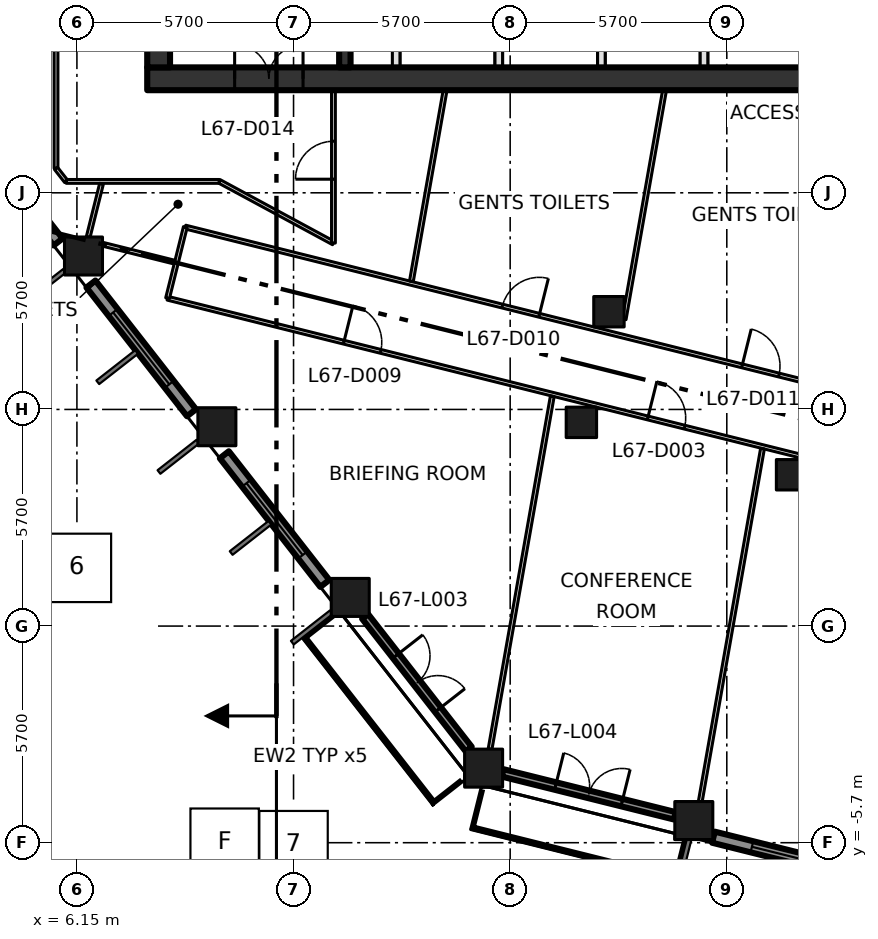
"""IFC4 building model, lengths in metres.
Left out: names, types, materials, properties, quantities, classifications, styles, units other than length and angle.
Written with IfcOpenShell. Run it as: python <this file> out.ifc"""

import sys

from ifc_helpers import new_model, si_unit, direction, frame, frame_2d, origin, origin_2d, place, context, subcontext, project, spatial, rectangle, extrude, element, fill, save


model = new_model("IFC4")
c1 = context("Model", 3, precision=1e-05, world=origin(), true_north=direction((0.0, 1.0)))
c2 = subcontext(c1, "Body", "Model", "MODEL_VIEW")
j1 = project(units=[si_unit("LENGTHUNIT", "METRE"), si_unit("PLANEANGLEUNIT", "RADIAN")], contexts=[c1])
p1 = place(None, origin())
s1 = spatial("IfcSite", under=j1, at=p1, CompositionType="ELEMENT")
p2 = place(p1, origin())
s2 = spatial("IfcBuilding", under=s1, at=p2, CompositionType="ELEMENT")
p3 = place(p2, frame((0.0, 0.0, 294.0)))
s3 = spatial("IfcBuildingStorey", under=s2, at=p3, CompositionType="ELEMENT", Elevation=294.0)
for number, where, z_axis, x_axis in (
    (1, (16.851, -3.738, 0.0), (0.0, 0.0, 1.0), (1.0, 0.0, 0.0)),
    (2, (13.342, 0.754, 0.0), (0.0, 0.0, 1.0), (1.0, 0.0, 0.0)),
    (3, (9.833, 5.245, 0.0), (0.0, 0.0, 1.0), (1.0, 0.0, 0.0)),
    (4, (6.323, 9.737, 0.0), (0.0, 0.0, 1.0), (1.0, 0.0, 0.0)),
    (5, (22.382, -5.117, 0.0), (0.0, 0.0, 1.0), (1.0, 0.0, 0.0)),
):
    element("IfcColumn", number, at=place(p3, frame(where, z_axis=z_axis, x_axis=x_axis)), inside=s3, PredefinedType="COLUMN", context=c2, shape_type="SweptSolid", body=[
        extrude(rectangle(XDim=1.0, YDim=1.0, at=origin_2d()), origin(), (0.0, 0.0, 1.0), 4.2),
    ])
for number, where, z_axis, x_axis in (
    (6, (19.424, 5.36, 0.0), (0.0, 0.0, 1.0), (1.0, 0.0, 0.0)),
    (7, (24.954, 3.981, 0.0), (0.0, 0.0, 1.0), (1.0, 0.0, 0.0)),
    (8, (20.149, 8.271, 0.0), (0.0, 0.0, 1.0), (1.0, 0.0, 0.0)),
):
    element("IfcColumn", number, at=place(p3, frame(where, z_axis=z_axis, x_axis=x_axis)), inside=s3, PredefinedType="COLUMN", context=c2, shape_type="SweptSolid", body=[
        extrude(rectangle(XDim=0.8, YDim=0.8, at=origin_2d()), origin(), (0.0, 0.0, 1.0), 4.2),
    ])
p4 = place(p3, frame((8.0, 14.4, -0.3), z_axis=(0.0, 0.0, 1.0), x_axis=(1.0, 0.0, 0.0)))
e9 = element("IfcWall", 9, at=p4, inside=s3, PredefinedType="SHEAR", context=c2, shape_type="SweptSolid", body=[
    extrude(rectangle(XDim=22.8, YDim=0.6, at=frame_2d((11.4, 0.0))), origin(), (0.0, 0.0, 1.0), 4.2),
])
p5 = place(p4, frame((2.3, 0.0, 0.3)))
e10 = element("IfcOpeningElement", 10, at=p5, cuts=e9, PredefinedType="OPENING", context=c2, shape_type="SweptSolid", body=[
    extrude(rectangle(XDim=1.8, YDim=2.1, at=frame_2d((0.9, 1.05))), frame((0.0, 0.31, 0.0), z_axis=(0.0, -1.0, 0.0), x_axis=(1.0, 0.0, 0.0)), (0.0, 0.0, 1.0), 0.62),
])
p6 = place(p3, frame((8.3, 14.7, -0.3), z_axis=(0.0, 0.0, 1.0), x_axis=(0.0, 1.0, 0.0)))
e11 = element("IfcWall", 11, at=p6, inside=s3, PredefinedType="SHEAR", context=c2, shape_type="SweptSolid", body=[
    extrude(rectangle(XDim=21.0, YDim=0.6, at=frame_2d((10.5, 0.0))), origin(), (0.0, 0.0, 1.0), 4.2),
])
p7 = place(p3, frame((13.2, 14.7, 0.0), z_axis=(0.0, 0.0, 1.0), x_axis=(0.0, 1.0, 0.0)))
e12 = element("IfcWall", 12, at=p7, inside=s3, PredefinedType="SHEAR", context=c2, shape_type="SweptSolid", body=[
    extrude(rectangle(XDim=21.0, YDim=0.3, at=frame_2d((10.5, 0.0))), origin(), (0.0, 0.0, 1.0), 3.9),
])
p8 = place(p7, frame((3.6, 0.0, 0.0)))
e13 = element("IfcOpeningElement", 13, at=p8, cuts=e12, PredefinedType="OPENING", context=c2, shape_type="SweptSolid", body=[
    extrude(rectangle(XDim=1.8, YDim=2.1, at=frame_2d((0.9, 1.05))), frame((0.0, 0.16, 0.0), z_axis=(0.0, -1.0, 0.0), x_axis=(1.0, 0.0, 0.0)), (0.0, 0.0, 1.0), 0.32),
])
p9 = place(p7, frame((11.7, 0.0, 0.0)))
e14 = element("IfcOpeningElement", 14, at=p9, cuts=e12, PredefinedType="OPENING", context=c2, shape_type="SweptSolid", body=[
    extrude(rectangle(XDim=1.2, YDim=2.1, at=frame_2d((0.6, 1.05))), frame((0.0, 0.16, 0.0), z_axis=(0.0, -1.0, 0.0), x_axis=(1.0, 0.0, 0.0)), (0.0, 0.0, 1.0), 0.32),
])
for number, where, z_axis, x_axis in (
    (15, (14.55, 14.7, 0.0), (0.0, 0.0, 1.0), (0.0, 1.0, 0.0)),
    (16, (17.25, 14.7, 0.0), (0.0, 0.0, 1.0), (0.0, 1.0, 0.0)),
    (17, (19.95, 14.7, 0.0), (0.0, 0.0, 1.0), (0.0, 1.0, 0.0)),
    (18, (22.65, 14.7, 0.0), (0.0, 0.0, 1.0), (0.0, 1.0, 0.0)),
):
    element("IfcWall", number, at=place(p3, frame(where, z_axis=z_axis, x_axis=x_axis)), inside=s3, PredefinedType="SOLIDWALL", context=c2, shape_type="SweptSolid", body=[
        extrude(rectangle(XDim=2.9, YDim=0.2, at=frame_2d((1.45, 0.0))), origin(), (0.0, 0.0, 1.0), 3.9),
    ])
p10 = place(p3, frame((3.01, 13.491, 0.0), z_axis=(0.0, 0.0, 1.0), x_axis=(0.615713519567, -0.787970089421, 0.0)))
e19 = element("IfcWall", 19, at=p10, inside=s3, PredefinedType="SOLIDWALL", context=c2, shape_type="SweptSolid", body=[
    extrude(rectangle(XDim=4.296, YDim=0.3, at=frame_2d((2.148, 0.0))), origin(), (0.0, 0.0, 1.0), 3.2),
])
p11 = place(p10, frame((0.948, 0.0, 0.8)))
e20 = element("IfcOpeningElement", 20, at=p11, cuts=e19, PredefinedType="OPENING", context=c2, shape_type="SweptSolid", body=[
    extrude(rectangle(XDim=2.4, YDim=2.1, at=frame_2d((1.2, 1.05))), frame((0.0, 0.16, 0.0), z_axis=(0.0, -1.0, 0.0), x_axis=(1.0, 0.0, 0.0)), (0.0, 0.0, 1.0), 0.32),
])
p12 = place(p3, frame((6.519, 9.0, 0.0), z_axis=(0.0, 0.0, 1.0), x_axis=(0.615634121154, -0.788032124263, 0.0)))
e21 = element("IfcWall", 21, at=p12, inside=s3, PredefinedType="SOLIDWALL", context=c2, shape_type="SweptSolid", body=[
    extrude(rectangle(XDim=4.298, YDim=0.3, at=frame_2d((2.149, 0.0))), origin(), (0.0, 0.0, 1.0), 3.2),
])
p13 = place(p12, frame((0.949, 0.0, 0.8)))
e22 = element("IfcOpeningElement", 22, at=p13, cuts=e21, PredefinedType="OPENING", context=c2, shape_type="SweptSolid", body=[
    extrude(rectangle(XDim=2.4, YDim=2.1, at=frame_2d((1.2, 1.05))), frame((0.0, 0.16, 0.0), z_axis=(0.0, -1.0, 0.0), x_axis=(1.0, 0.0, 0.0)), (0.0, 0.0, 1.0), 0.32),
])
p14 = place(p3, frame((10.029, 4.507, 0.0), z_axis=(0.0, 0.0, 1.0), x_axis=(0.615572343689, -0.788080382756, 0.0)))
e23 = element("IfcWall", 23, at=p14, inside=s3, PredefinedType="SOLIDWALL", context=c2, shape_type="SweptSolid", body=[
    extrude(rectangle(XDim=4.295, YDim=0.3, at=frame_2d((2.147, 0.0))), origin(), (0.0, 0.0, 1.0), 3.2),
])
p15 = place(p14, frame((0.948, 0.0, 0.8)))
e24 = element("IfcOpeningElement", 24, at=p15, cuts=e23, PredefinedType="OPENING", context=c2, shape_type="SweptSolid", body=[
    extrude(rectangle(XDim=2.4, YDim=2.1, at=frame_2d((1.2, 1.05))), frame((0.0, 0.16, 0.0), z_axis=(0.0, -1.0, 0.0), x_axis=(1.0, 0.0, 0.0)), (0.0, 0.0, 1.0), 0.32),
])
p16 = place(p3, frame((13.733, 0.254, 0.0), z_axis=(0.0, 0.0, 1.0), x_axis=(0.615499674676, -0.788137139382, 0.0)))
e25 = element("IfcWall", 25, at=p16, inside=s3, PredefinedType="SOLIDWALL", context=c2, shape_type="SweptSolid", body=[
    extrude(rectangle(XDim=4.431, YDim=0.2, at=frame_2d((2.215, 0.0))), origin(), (0.0, 0.0, 1.0), 3.2),
])
p17 = place(p16, frame((1.315, 0.0, 0.0)))
e26 = element("IfcOpeningElement", 26, at=p17, cuts=e25, PredefinedType="OPENING", context=c2, shape_type="SweptSolid", body=[
    extrude(rectangle(XDim=1.8, YDim=2.9, at=frame_2d((0.9, 1.45))), frame((0.0, 0.11, 0.0), z_axis=(0.0, -1.0, 0.0), x_axis=(1.0, 0.0, 0.0)), (0.0, 0.0, 1.0), 0.22),
])
p18 = place(p3, frame((12.398, -0.199, 0.0), z_axis=(0.0, 0.0, 1.0), x_axis=(0.615638738903, -0.788028516719, 0.0)))
e27 = element("IfcWall", 27, at=p18, inside=s3, PredefinedType="SOLIDWALL", context=c2, shape_type="SweptSolid", body=[
    extrude(rectangle(XDim=5.36, YDim=0.4, at=frame_2d((2.68, 0.0))), origin(), (0.0, 0.0, 1.0), 0.3),
])
p19 = place(p3, frame((17.351, -3.863, 0.0), z_axis=(0.0, 0.0, 1.0), x_axis=(0.970335948358, -0.241760516472, 0.0)))
e28 = element("IfcWall", 28, at=p19, inside=s3, PredefinedType="SOLIDWALL", context=c2, shape_type="SweptSolid", body=[
    extrude(rectangle(XDim=4.669, YDim=0.2, at=frame_2d((2.335, 0.0))), origin(), (0.0, 0.0, 1.0), 3.2),
])
p20 = place(p19, frame((1.434, 0.0, 0.0)))
e29 = element("IfcOpeningElement", 29, at=p20, cuts=e28, PredefinedType="OPENING", context=c2, shape_type="SweptSolid", body=[
    extrude(rectangle(XDim=1.8, YDim=2.9, at=frame_2d((0.9, 1.45))), frame((0.0, 0.11, 0.0), z_axis=(0.0, -1.0, 0.0), x_axis=(1.0, 0.0, 0.0)), (0.0, 0.0, 1.0), 0.22),
])
p21 = place(p3, frame((16.694, -5.069, 0.0), z_axis=(0.0, 0.0, 1.0), x_axis=(0.970289679319, -0.241946147329, 0.0)))
e30 = element("IfcWall", 30, at=p21, inside=s3, PredefinedType="SOLIDWALL", context=c2, shape_type="SweptSolid", body=[
    extrude(rectangle(XDim=5.36, YDim=0.4, at=frame_2d((2.68, 0.0))), origin(), (0.0, 0.0, 1.0), 0.3),
])
p22 = place(p3, frame((22.898, -5.555, 0.0), z_axis=(0.0, 0.0, 1.0), x_axis=(0.970315118421, -0.24184410467, 0.0)))
e31 = element("IfcWall", 31, at=p22, inside=s3, PredefinedType="SOLIDWALL", context=c2, shape_type="SweptSolid", body=[
    extrude(rectangle(XDim=4.486, YDim=0.3, at=frame_2d((2.243, 0.0))), origin(), (0.0, 0.0, 1.0), 3.2),
])
p23 = place(p22, frame((1.044, 0.0, 0.8)))
e32 = element("IfcOpeningElement", 32, at=p23, cuts=e31, PredefinedType="OPENING", context=c2, shape_type="SweptSolid", body=[
    extrude(rectangle(XDim=2.4, YDim=2.1, at=frame_2d((1.2, 1.05))), frame((0.0, 0.16, 0.0), z_axis=(0.0, -1.0, 0.0), x_axis=(1.0, 0.0, 0.0)), (0.0, 0.0, 1.0), 0.32),
])
p24 = place(p3, frame((5.6, 12.043, 0.0), z_axis=(0.0, 0.0, 1.0), x_axis=(0.0, 1.0, 0.0)))
e33 = element("IfcWall", 33, at=p24, inside=s3, PredefinedType="PARTITIONING", context=c2, shape_type="SweptSolid", body=[
    extrude(rectangle(XDim=27.162, YDim=0.1, at=frame_2d((13.581, 0.0))), origin(), (0.0, 0.0, 1.0), 3.9),
])
p25 = place(p24, frame((4.48, 0.0, 0.0)))
e34 = element("IfcOpeningElement", 34, at=p25, cuts=e33, PredefinedType="OPENING", context=c2, shape_type="SweptSolid", body=[
    extrude(rectangle(XDim=1.0, YDim=2.1, at=frame_2d((0.5, 1.05))), frame((0.0, 0.06, 0.0), z_axis=(0.0, -1.0, 0.0), x_axis=(1.0, 0.0, 0.0)), (0.0, 0.0, 1.0), 0.12),
])
p26 = place(p24, frame((12.742, 0.0, 0.0)))
e35 = element("IfcOpeningElement", 35, at=p26, cuts=e33, PredefinedType="OPENING", context=c2, shape_type="SweptSolid", body=[
    extrude(rectangle(XDim=1.0, YDim=2.1, at=frame_2d((0.5, 1.05))), frame((0.0, 0.06, 0.0), z_axis=(0.0, -1.0, 0.0), x_axis=(1.0, 0.0, 0.0)), (0.0, 0.0, 1.0), 0.12),
])
p27 = place(p24, frame((21.142, 0.0, 0.0)))
e36 = element("IfcOpeningElement", 36, at=p27, cuts=e33, PredefinedType="OPENING", context=c2, shape_type="SweptSolid", body=[
    extrude(rectangle(XDim=1.0, YDim=2.1, at=frame_2d((0.5, 1.05))), frame((0.0, 0.06, 0.0), z_axis=(0.0, -1.0, 0.0), x_axis=(1.0, 0.0, 0.0)), (0.0, 0.0, 1.0), 0.12),
])
p28 = place(p3, frame((5.6, 12.043, 0.0), z_axis=(0.0, 0.0, 1.0), x_axis=(0.615415398102, -0.788202948344, 0.0)))
e37 = element("IfcWall", 37, at=p28, inside=s3, PredefinedType="PARTITIONING", context=c2, shape_type="SweptSolid", body=[
    extrude(rectangle(XDim=0.435, YDim=0.1, at=frame_2d((0.218, 0.0))), origin(), (0.0, 0.0, 1.0), 3.9),
])
p29 = place(p3, frame((5.868, 11.7, 0.0), z_axis=(0.0, 0.0, 1.0), x_axis=(1.0, 0.0, 0.0)))
e38 = element("IfcWall", 38, at=p29, inside=s3, PredefinedType="PARTITIONING", context=c2, shape_type="SweptSolid", body=[
    extrude(rectangle(XDim=4.032, YDim=0.1, at=frame_2d((2.016, 0.0))), origin(), (0.0, 0.0, 1.0), 3.9),
])
p30 = place(p3, frame((8.535, 8.626, 0.0), z_axis=(0.0, 0.0, 1.0), x_axis=(0.970294986727, -0.241924861749, 0.0)))
e39 = element("IfcWall", 39, at=p30, inside=s3, PredefinedType="PARTITIONING", context=c2, shape_type="SweptSolid", body=[
    extrude(rectangle(XDim=28.501, YDim=0.1, at=frame_2d((14.25, 0.0))), origin(), (0.0, 0.0, 1.0), 3.9),
])
p31 = place(p30, frame((13.022, 0.0, 0.0)))
e40 = element("IfcOpeningElement", 40, at=p31, cuts=e39, PredefinedType="OPENING", context=c2, shape_type="SweptSolid", body=[
    extrude(rectangle(XDim=1.0, YDim=2.1, at=frame_2d((0.5, 1.05))), frame((0.0, 0.06, 0.0), z_axis=(0.0, -1.0, 0.0), x_axis=(1.0, 0.0, 0.0)), (0.0, 0.0, 1.0), 0.12),
])
p32 = place(p30, frame((20.622, 0.0, 0.0)))
e41 = element("IfcOpeningElement", 41, at=p32, cuts=e39, PredefinedType="OPENING", context=c2, shape_type="SweptSolid", body=[
    extrude(rectangle(XDim=1.0, YDim=2.1, at=frame_2d((0.5, 1.05))), frame((0.0, 0.06, 0.0), z_axis=(0.0, -1.0, 0.0), x_axis=(1.0, 0.0, 0.0)), (0.0, 0.0, 1.0), 0.12),
])
p33 = place(p30, frame((4.78, 0.0, 0.0)))
e42 = element("IfcOpeningElement", 42, at=p33, cuts=e39, PredefinedType="OPENING", context=c2, shape_type="SweptSolid", body=[
    extrude(rectangle(XDim=1.0, YDim=2.1, at=frame_2d((0.5, 1.05))), frame((0.0, 0.06, 0.0), z_axis=(0.0, -1.0, 0.0), x_axis=(1.0, 0.0, 0.0)), (0.0, 0.0, 1.0), 0.12),
])
p34 = place(p3, frame((9.002, 10.499, 0.0), z_axis=(0.0, 0.0, 1.0), x_axis=(0.970298340477, -0.241911410372, 0.0)))
e43 = element("IfcWall", 43, at=p34, inside=s3, PredefinedType="PARTITIONING", context=c2, shape_type="SweptSolid", body=[
    extrude(rectangle(XDim=19.88, YDim=0.1, at=frame_2d((9.94, 0.0))), origin(), (0.0, 0.0, 1.0), 3.9),
])
p35 = place(p34, frame((8.597, 0.0, 0.0)))
e44 = element("IfcOpeningElement", 44, at=p35, cuts=e43, PredefinedType="OPENING", context=c2, shape_type="SweptSolid", body=[
    extrude(rectangle(XDim=1.0, YDim=2.1, at=frame_2d((0.5, 1.05))), frame((0.0, 0.06, 0.0), z_axis=(0.0, -1.0, 0.0), x_axis=(1.0, 0.0, 0.0)), (0.0, 0.0, 1.0), 0.12),
])
p36 = place(p34, frame((15.098, 0.0, 0.0)))
e45 = element("IfcOpeningElement", 45, at=p36, cuts=e43, PredefinedType="OPENING", context=c2, shape_type="SweptSolid", body=[
    extrude(rectangle(XDim=1.0, YDim=2.1, at=frame_2d((0.5, 1.05))), frame((0.0, 0.06, 0.0), z_axis=(0.0, -1.0, 0.0), x_axis=(1.0, 0.0, 0.0)), (0.0, 0.0, 1.0), 0.12),
])
p37 = place(p3, frame((9.002, 10.499, 0.0), z_axis=(0.0, 0.0, 1.0), x_axis=(-0.241940418317, -0.970291107856, 0.0)))
e46 = element("IfcWall", 46, at=p37, inside=s3, PredefinedType="PARTITIONING", context=c2, shape_type="SweptSolid", body=[
    extrude(rectangle(XDim=1.93, YDim=0.1, at=frame_2d((0.965, 0.0))), origin(), (0.0, 0.0, 1.0), 3.9),
])
p38 = place(p3, frame((9.9, 11.7, 0.0), z_axis=(0.0, 0.0, 1.0), x_axis=(0.87965147249, -0.475618846291, 0.0)))
e47 = element("IfcWall", 47, at=p38, inside=s3, PredefinedType="PARTITIONING", context=c2, shape_type="SweptSolid", body=[
    extrude(rectangle(XDim=3.41, YDim=0.1, at=frame_2d((1.705, 0.0))), origin(), (0.0, 0.0, 1.0), 3.9),
])
p39 = place(p3, frame((12.9, 10.078, 0.0), z_axis=(0.0, 0.0, 1.0), x_axis=(0.0, 1.0, 0.0)))
e48 = element("IfcWall", 48, at=p39, inside=s3, PredefinedType="PARTITIONING", context=c2, shape_type="SweptSolid", body=[
    extrude(rectangle(XDim=4.022, YDim=0.1, at=frame_2d((2.011, 0.0))), origin(), (0.0, 0.0, 1.0), 3.9),
])
p40 = place(p39, frame((1.68, 0.0, 0.0)))
e49 = element("IfcOpeningElement", 49, at=p40, cuts=e48, PredefinedType="OPENING", context=c2, shape_type="SweptSolid", body=[
    extrude(rectangle(XDim=1.0, YDim=2.1, at=frame_2d((0.5, 1.05))), frame((0.0, 0.06, 0.0), z_axis=(0.0, -1.0, 0.0), x_axis=(1.0, 0.0, 0.0)), (0.0, 0.0, 1.0), 0.12),
])
p41 = place(p3, frame((6.797, 11.638, 0.0), z_axis=(0.0, 0.0, 1.0), x_axis=(-0.242456058691, -0.970162388265, 0.0)))
e50 = element("IfcWall", 50, at=p41, inside=s3, PredefinedType="PARTITIONING", context=c2, shape_type="SweptSolid", body=[
    extrude(rectangle(XDim=1.444, YDim=0.1, at=frame_2d((0.722, 0.0))), origin(), (0.0, 0.0, 1.0), 3.9),
])
p42 = place(p3, frame((8.72, 9.575, 0.0), z_axis=(0.0, 0.0, 1.0), x_axis=(-0.970274576003, 0.242006708918, 0.0)))
e51 = element("IfcWall", 51, at=p42, inside=s3, PredefinedType="PARTITIONING", context=c2, shape_type="SweptSolid", body=[
    extrude(rectangle(XDim=1.955, YDim=0.1, at=frame_2d((0.978, 0.0))), origin(), (0.0, 0.0, 1.0), 3.9),
])
p43 = place(p3, frame((14.951, 9.071, 0.0), z_axis=(0.0, 0.0, 1.0), x_axis=(0.173687149785, 0.984800880381, 0.0)))
e52 = element("IfcWall", 52, at=p43, inside=s3, PredefinedType="PARTITIONING", context=c2, shape_type="SweptSolid", body=[
    extrude(rectangle(XDim=5.107, YDim=0.1, at=frame_2d((2.553, 0.0))), origin(), (0.0, 0.0, 1.0), 3.9),
])
p44 = place(p3, frame((17.021, -3.238, 0.0), z_axis=(0.0, 0.0, 1.0), x_axis=(0.173621363154, 0.984812480758, 0.0)))
e53 = element("IfcWall", 53, at=p44, inside=s3, PredefinedType="PARTITIONING", context=c2, shape_type="SweptSolid", body=[
    extrude(rectangle(XDim=9.428, YDim=0.1, at=frame_2d((4.714, 0.0))), origin(), (0.0, 0.0, 1.0), 3.9),
])
p45 = place(p3, frame((20.549, 8.07, 0.0), z_axis=(0.0, 0.0, 1.0), x_axis=(0.173605636367, 0.984815253244, 0.0)))
e54 = element("IfcWall", 54, at=p45, inside=s3, PredefinedType="PARTITIONING", context=c2, shape_type="SweptSolid", body=[
    extrude(rectangle(XDim=6.123, YDim=0.1, at=frame_2d((3.062, 0.0))), origin(), (0.0, 0.0, 1.0), 3.9),
])
p46 = place(p3, frame((22.552, -4.617, 0.0), z_axis=(0.0, 0.0, 1.0), x_axis=(0.173625790791, 0.98481170016, 0.0)))
e55 = element("IfcWall", 55, at=p46, inside=s3, PredefinedType="PARTITIONING", context=c2, shape_type="SweptSolid", body=[
    extrude(rectangle(XDim=9.428, YDim=0.1, at=frame_2d((4.714, 0.0))), origin(), (0.0, 0.0, 1.0), 3.9),
])
p47 = place(p5, origin())
e56 = element("IfcDoor", 56, at=p47, inside=s3, OperationType="DOUBLE_DOOR_SINGLE_SWING", PredefinedType="DOOR", context=c2, shape_type="SweptSolid", body=[
    extrude(rectangle(XDim=1.8, YDim=2.1, at=frame_2d((0.9, 1.05))), frame((0.0, 0.025, 0.0), z_axis=(0.0, -1.0, 0.0), x_axis=(1.0, 0.0, 0.0)), (0.0, 0.0, 1.0), 0.05),
])
fill(e10, e56)
p48 = place(p13, origin())
e57 = element("IfcWindow", 57, at=p48, inside=s3, PartitioningType="DOUBLE_PANEL_VERTICAL", PredefinedType="WINDOW", context=c2, shape_type="SweptSolid", body=[
    extrude(rectangle(XDim=2.4, YDim=2.1, at=frame_2d((1.2, 1.05))), frame((0.0, 0.03, 0.0), z_axis=(0.0, -1.0, 0.0), x_axis=(1.0, 0.0, 0.0)), (0.0, 0.0, 1.0), 0.06),
])
fill(e22, e57)
p49 = place(p15, origin())
e58 = element("IfcWindow", 58, at=p49, inside=s3, PartitioningType="DOUBLE_PANEL_VERTICAL", PredefinedType="WINDOW", context=c2, shape_type="SweptSolid", body=[
    extrude(rectangle(XDim=2.4, YDim=2.1, at=frame_2d((1.2, 1.05))), frame((0.0, 0.03, 0.0), z_axis=(0.0, -1.0, 0.0), x_axis=(1.0, 0.0, 0.0)), (0.0, 0.0, 1.0), 0.06),
])
fill(e24, e58)
p50 = place(p17, origin())
e59 = element("IfcDoor", 59, at=p50, inside=s3, OperationType="DOUBLE_DOOR_SINGLE_SWING", PredefinedType="DOOR", context=c2, shape_type="SweptSolid", body=[
    extrude(rectangle(XDim=1.8, YDim=2.9, at=frame_2d((0.9, 1.45))), frame((0.0, 0.025, 0.0), z_axis=(0.0, -1.0, 0.0), x_axis=(1.0, 0.0, 0.0)), (0.0, 0.0, 1.0), 0.05),
])
fill(e26, e59)
p51 = place(p20, origin())
e60 = element("IfcDoor", 60, at=p51, inside=s3, OperationType="DOUBLE_DOOR_SINGLE_SWING", PredefinedType="DOOR", context=c2, shape_type="SweptSolid", body=[
    extrude(rectangle(XDim=1.8, YDim=2.9, at=frame_2d((0.9, 1.45))), frame((0.0, 0.025, 0.0), z_axis=(0.0, -1.0, 0.0), x_axis=(1.0, 0.0, 0.0)), (0.0, 0.0, 1.0), 0.05),
])
fill(e29, e60)
p52 = place(p23, origin())
e61 = element("IfcWindow", 61, at=p52, inside=s3, PartitioningType="DOUBLE_PANEL_VERTICAL", PredefinedType="WINDOW", context=c2, shape_type="SweptSolid", body=[
    extrude(rectangle(XDim=2.4, YDim=2.1, at=frame_2d((1.2, 1.05))), frame((0.0, 0.03, 0.0), z_axis=(0.0, -1.0, 0.0), x_axis=(1.0, 0.0, 0.0)), (0.0, 0.0, 1.0), 0.06),
])
fill(e32, e61)
p53 = place(p31, origin())
e62 = element("IfcDoor", 62, at=p53, inside=s3, OperationType="SINGLE_SWING_LEFT", PredefinedType="DOOR", context=c2, shape_type="SweptSolid", body=[
    extrude(rectangle(XDim=1.0, YDim=2.1, at=frame_2d((0.5, 1.05))), frame((0.0, 0.025, 0.0), z_axis=(0.0, -1.0, 0.0), x_axis=(1.0, 0.0, 0.0)), (0.0, 0.0, 1.0), 0.05),
])
fill(e40, e62)
p54 = place(p33, origin())
e63 = element("IfcDoor", 63, at=p54, inside=s3, OperationType="SINGLE_SWING_LEFT", PredefinedType="DOOR", context=c2, shape_type="SweptSolid", body=[
    extrude(rectangle(XDim=1.0, YDim=2.1, at=frame_2d((0.5, 1.05))), frame((0.0, 0.025, 0.0), z_axis=(0.0, -1.0, 0.0), x_axis=(1.0, 0.0, 0.0)), (0.0, 0.0, 1.0), 0.05),
])
fill(e42, e63)
p55 = place(p35, origin())
e64 = element("IfcDoor", 64, at=p55, inside=s3, OperationType="SINGLE_SWING_RIGHT", PredefinedType="DOOR", context=c2, shape_type="SweptSolid", body=[
    extrude(rectangle(XDim=1.0, YDim=2.1, at=frame_2d((0.5, 1.05))), frame((0.0, 0.025, 0.0), z_axis=(0.0, -1.0, 0.0), x_axis=(1.0, 0.0, 0.0)), (0.0, 0.0, 1.0), 0.05),
])
fill(e44, e64)
p56 = place(p36, origin())
e65 = element("IfcDoor", 65, at=p56, inside=s3, OperationType="SINGLE_SWING_LEFT", PredefinedType="DOOR", context=c2, shape_type="SweptSolid", body=[
    extrude(rectangle(XDim=1.0, YDim=2.1, at=frame_2d((0.5, 1.05))), frame((0.0, 0.025, 0.0), z_axis=(0.0, -1.0, 0.0), x_axis=(1.0, 0.0, 0.0)), (0.0, 0.0, 1.0), 0.05),
])
fill(e45, e65)
p57 = place(p40, origin())
e66 = element("IfcDoor", 66, at=p57, inside=s3, OperationType="SINGLE_SWING_LEFT", PredefinedType="DOOR", context=c2, shape_type="SweptSolid", body=[
    extrude(rectangle(XDim=1.0, YDim=2.1, at=frame_2d((0.5, 1.05))), frame((0.0, 0.025, 0.0), z_axis=(0.0, -1.0, 0.0), x_axis=(1.0, 0.0, 0.0)), (0.0, 0.0, 1.0), 0.05),
])
fill(e49, e66)
save(model, sys.argv[1])
